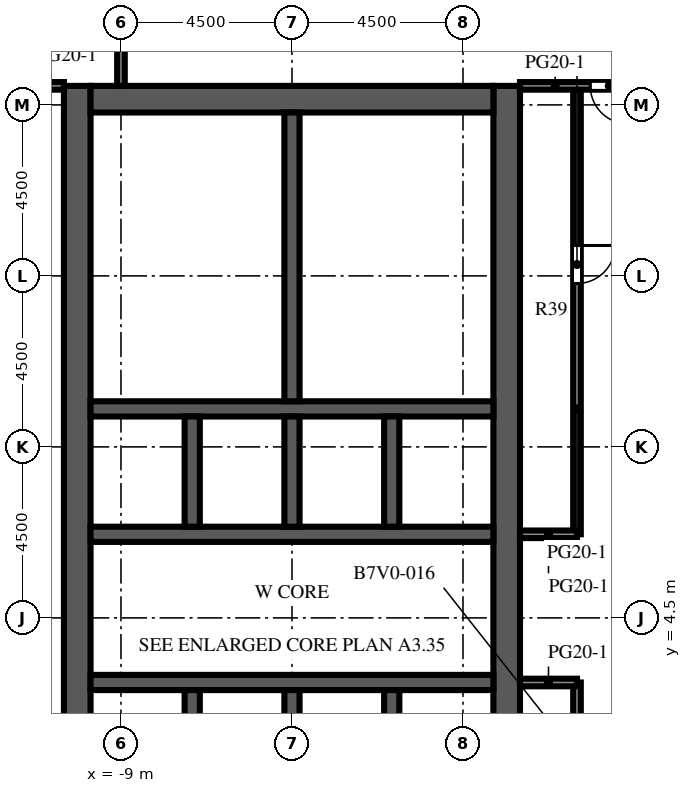
"""IFC4 building model, lengths in metres.
Left out: names, types, materials, properties, quantities, classifications, styles, units other than length and angle.
Written with IfcOpenShell. Run it as: python <this file> out.ifc"""

import sys

from ifc_helpers import new_model, si_unit, direction, frame, frame_2d, origin, place, context, subcontext, project, spatial, rectangle, extrude, element, fill, save


model = new_model("IFC4")
c1 = context("Model", 3, precision=1e-05, world=origin(), true_north=direction((0.0, 1.0)))
c2 = subcontext(c1, "Body", "Model", "MODEL_VIEW")
j1 = project(units=[si_unit("LENGTHUNIT", "METRE"), si_unit("PLANEANGLEUNIT", "RADIAN")], contexts=[c1])
p1 = place(None, origin())
s1 = spatial("IfcSite", under=j1, at=p1, CompositionType="ELEMENT")
p2 = place(p1, origin())
s2 = spatial("IfcBuilding", under=s1, at=p2, CompositionType="ELEMENT")
p3 = place(p2, frame((0.0, 0.0, 239.8)))
s3 = spatial("IfcBuildingStorey", under=s2, at=p3, CompositionType="ELEMENT", Elevation=239.8)
p4 = place(p3, frame((-10.15, -9.0, 0.0), z_axis=(0.0, 0.0, 1.0), x_axis=(0.0, 1.0, 0.0)))
e1 = element("IfcWall", 1, at=p4, inside=s3, PredefinedType="SHEAR", context=c2, shape_type="SweptSolid", body=[
    extrude(rectangle(XDim=27.5, YDim=0.7, at=frame_2d((13.75, 0.0))), origin(), (0.0, 0.0, 1.0), 4.1),
])
p5 = place(p4, frame((12.55, 0.0, 0.0)))
e2 = element("IfcOpeningElement", 2, at=p5, cuts=e1, PredefinedType="OPENING", context=c2, shape_type="SweptSolid", body=[
    extrude(rectangle(XDim=2.4, YDim=2.4, at=frame_2d((1.2, 1.2))), frame((0.0, 0.36, 0.0), z_axis=(0.0, -1.0, 0.0), x_axis=(1.0, 0.0, 0.0)), (0.0, 0.0, 1.0), 0.72),
])
p6 = place(p4, frame((6.825, 0.0, 0.0)))
e3 = element("IfcOpeningElement", 3, at=p6, cuts=e1, PredefinedType="OPENING", context=c2, shape_type="SweptSolid", body=[
    extrude(rectangle(XDim=1.2, YDim=2.1, at=frame_2d((0.6, 1.05))), frame((0.0, 0.36, 0.0), z_axis=(0.0, -1.0, 0.0), x_axis=(1.0, 0.0, 0.0)), (0.0, 0.0, 1.0), 0.72),
])
p7 = place(p4, frame((19.475, 0.0, 0.0)))
e4 = element("IfcOpeningElement", 4, at=p7, cuts=e1, PredefinedType="OPENING", context=c2, shape_type="SweptSolid", body=[
    extrude(rectangle(XDim=1.2, YDim=2.1, at=frame_2d((0.6, 1.05))), frame((0.0, 0.36, 0.0), z_axis=(0.0, -1.0, 0.0), x_axis=(1.0, 0.0, 0.0)), (0.0, 0.0, 1.0), 0.72),
])
p8 = place(p3, frame((1.15, -9.0, 0.0), z_axis=(0.0, 0.0, 1.0), x_axis=(0.0, 1.0, 0.0)))
e5 = element("IfcWall", 5, at=p8, inside=s3, PredefinedType="SHEAR", context=c2, shape_type="SweptSolid", body=[
    extrude(rectangle(XDim=27.5, YDim=0.7, at=frame_2d((13.75, 0.0))), origin(), (0.0, 0.0, 1.0), 4.1),
])
p9 = place(p8, frame((12.55, 0.0, 0.0)))
e6 = element("IfcOpeningElement", 6, at=p9, cuts=e5, PredefinedType="OPENING", context=c2, shape_type="SweptSolid", body=[
    extrude(rectangle(XDim=2.4, YDim=2.4, at=frame_2d((1.2, 1.2))), frame((0.0, 0.36, 0.0), z_axis=(0.0, -1.0, 0.0), x_axis=(1.0, 0.0, 0.0)), (0.0, 0.0, 1.0), 0.72),
])
p10 = place(p8, frame((5.42, 0.0, 0.0)))
e7 = element("IfcOpeningElement", 7, at=p10, cuts=e5, PredefinedType="OPENING", context=c2, shape_type="SweptSolid", body=[
    extrude(rectangle(XDim=1.2, YDim=2.1, at=frame_2d((0.6, 1.05))), frame((0.0, 0.36, 0.0), z_axis=(0.0, -1.0, 0.0), x_axis=(1.0, 0.0, 0.0)), (0.0, 0.0, 1.0), 0.72),
])
p11 = place(p8, frame((19.46, 0.0, 0.0)))
e8 = element("IfcOpeningElement", 8, at=p11, cuts=e5, PredefinedType="OPENING", context=c2, shape_type="SweptSolid", body=[
    extrude(rectangle(XDim=1.0, YDim=2.1, at=frame_2d((0.5, 1.05))), frame((0.0, 0.36, 0.0), z_axis=(0.0, -1.0, 0.0), x_axis=(1.0, 0.0, 0.0)), (0.0, 0.0, 1.0), 0.72),
])
p12 = place(p8, frame((21.17, 0.0, 0.0)))
e9 = element("IfcOpeningElement", 9, at=p12, cuts=e5, PredefinedType="OPENING", context=c2, shape_type="SweptSolid", body=[
    extrude(rectangle(XDim=1.0, YDim=2.1, at=frame_2d((0.5, 1.05))), frame((0.0, 0.36, 0.0), z_axis=(0.0, -1.0, 0.0), x_axis=(1.0, 0.0, 0.0)), (0.0, 0.0, 1.0), 0.72),
])
p13 = place(p8, frame((23.26, 0.0, 0.0)))
e10 = element("IfcOpeningElement", 10, at=p13, cuts=e5, PredefinedType="OPENING", context=c2, shape_type="SweptSolid", body=[
    extrude(rectangle(XDim=1.0, YDim=2.1, at=frame_2d((0.5, 1.05))), frame((0.0, 0.36, 0.0), z_axis=(0.0, -1.0, 0.0), x_axis=(1.0, 0.0, 0.0)), (0.0, 0.0, 1.0), 0.72),
])
p14 = place(p8, frame((25.35, 0.0, 0.0)))
e11 = element("IfcOpeningElement", 11, at=p14, cuts=e5, PredefinedType="OPENING", context=c2, shape_type="SweptSolid", body=[
    extrude(rectangle(XDim=1.0, YDim=2.1, at=frame_2d((0.5, 1.05))), frame((0.0, 0.36, 0.0), z_axis=(0.0, -1.0, 0.0), x_axis=(1.0, 0.0, 0.0)), (0.0, 0.0, 1.0), 0.72),
])
p15 = place(p3, frame((-9.8, 18.15, 0.0), z_axis=(0.0, 0.0, 1.0), x_axis=(1.0, 0.0, 0.0)))
e12 = element("IfcWall", 12, at=p15, inside=s3, PredefinedType="SHEAR", context=c2, shape_type="SweptSolid", body=[
    extrude(rectangle(XDim=10.6, YDim=0.7, at=frame_2d((5.3, 0.0))), origin(), (0.0, 0.0, 1.0), 4.1),
])
p16 = place(p3, frame((-9.8, 2.8, 0.0), z_axis=(0.0, 0.0, 1.0), x_axis=(1.0, 0.0, 0.0)))
e13 = element("IfcWall", 13, at=p16, inside=s3, PredefinedType="SHEAR", context=c2, shape_type="SweptSolid", body=[
    extrude(rectangle(XDim=10.6, YDim=0.4, at=frame_2d((5.3, 0.0))), origin(), (0.0, 0.0, 1.0), 4.1),
])
p17 = place(p16, frame((0.688, 0.0, 0.0)))
e14 = element("IfcOpeningElement", 14, at=p17, cuts=e13, PredefinedType="OPENING", context=c2, shape_type="SweptSolid", body=[
    extrude(rectangle(XDim=1.1, YDim=2.1, at=frame_2d((0.55, 1.05))), frame((0.0, 0.21, 0.0), z_axis=(0.0, -1.0, 0.0), x_axis=(1.0, 0.0, 0.0)), (0.0, 0.0, 1.0), 0.42),
])
p18 = place(p16, frame((3.438, 0.0, 0.0)))
e15 = element("IfcOpeningElement", 15, at=p18, cuts=e13, PredefinedType="OPENING", context=c2, shape_type="SweptSolid", body=[
    extrude(rectangle(XDim=1.1, YDim=2.1, at=frame_2d((0.55, 1.05))), frame((0.0, 0.21, 0.0), z_axis=(0.0, -1.0, 0.0), x_axis=(1.0, 0.0, 0.0)), (0.0, 0.0, 1.0), 0.42),
])
p19 = place(p16, frame((6.113, 0.0, 0.0)))
e16 = element("IfcOpeningElement", 16, at=p19, cuts=e13, PredefinedType="OPENING", context=c2, shape_type="SweptSolid", body=[
    extrude(rectangle(XDim=1.0, YDim=2.1, at=frame_2d((0.5, 1.05))), frame((0.0, 0.21, 0.0), z_axis=(0.0, -1.0, 0.0), x_axis=(1.0, 0.0, 0.0)), (0.0, 0.0, 1.0), 0.42),
])
p20 = place(p16, frame((8.863, 0.0, 0.0)))
e17 = element("IfcOpeningElement", 17, at=p20, cuts=e13, PredefinedType="OPENING", context=c2, shape_type="SweptSolid", body=[
    extrude(rectangle(XDim=1.0, YDim=2.1, at=frame_2d((0.5, 1.05))), frame((0.0, 0.21, 0.0), z_axis=(0.0, -1.0, 0.0), x_axis=(1.0, 0.0, 0.0)), (0.0, 0.0, 1.0), 0.42),
])
p21 = place(p3, frame((-9.8, 6.7, 0.0), z_axis=(0.0, 0.0, 1.0), x_axis=(1.0, 0.0, 0.0)))
e18 = element("IfcWall", 18, at=p21, inside=s3, PredefinedType="SHEAR", context=c2, shape_type="SweptSolid", body=[
    extrude(rectangle(XDim=10.6, YDim=0.4, at=frame_2d((5.3, 0.0))), origin(), (0.0, 0.0, 1.0), 4.1),
])
p22 = place(p21, frame((3.438, 0.0, 0.0)))
e19 = element("IfcOpeningElement", 19, at=p22, cuts=e18, PredefinedType="OPENING", context=c2, shape_type="SweptSolid", body=[
    extrude(rectangle(XDim=1.1, YDim=2.1, at=frame_2d((0.55, 1.05))), frame((0.0, 0.21, 0.0), z_axis=(0.0, -1.0, 0.0), x_axis=(1.0, 0.0, 0.0)), (0.0, 0.0, 1.0), 0.42),
])
p23 = place(p21, frame((6.062, 0.0, 0.0)))
e20 = element("IfcOpeningElement", 20, at=p23, cuts=e18, PredefinedType="OPENING", context=c2, shape_type="SweptSolid", body=[
    extrude(rectangle(XDim=1.1, YDim=2.1, at=frame_2d((0.55, 1.05))), frame((0.0, 0.21, 0.0), z_axis=(0.0, -1.0, 0.0), x_axis=(1.0, 0.0, 0.0)), (0.0, 0.0, 1.0), 0.42),
])
p24 = place(p21, frame((8.812, 0.0, 0.0)))
e21 = element("IfcOpeningElement", 21, at=p24, cuts=e18, PredefinedType="OPENING", context=c2, shape_type="SweptSolid", body=[
    extrude(rectangle(XDim=1.1, YDim=2.1, at=frame_2d((0.55, 1.05))), frame((0.0, 0.21, 0.0), z_axis=(0.0, -1.0, 0.0), x_axis=(1.0, 0.0, 0.0)), (0.0, 0.0, 1.0), 0.42),
])
p25 = place(p21, frame((0.738, 0.0, 0.0)))
e22 = element("IfcOpeningElement", 22, at=p25, cuts=e18, PredefinedType="OPENING", context=c2, shape_type="SweptSolid", body=[
    extrude(rectangle(XDim=1.0, YDim=2.1, at=frame_2d((0.5, 1.05))), frame((0.0, 0.21, 0.0), z_axis=(0.0, -1.0, 0.0), x_axis=(1.0, 0.0, 0.0)), (0.0, 0.0, 1.0), 0.42),
])
p26 = place(p3, frame((-9.8, 10.0, 0.0), z_axis=(0.0, 0.0, 1.0), x_axis=(1.0, 0.0, 0.0)))
e23 = element("IfcWall", 23, at=p26, inside=s3, PredefinedType="SHEAR", context=c2, shape_type="SweptSolid", body=[
    extrude(rectangle(XDim=10.6, YDim=0.4, at=frame_2d((5.3, 0.0))), origin(), (0.0, 0.0, 1.0), 4.1),
])
for number, where, z_axis, x_axis in (
    (24, (-7.125, -0.3, 0.0), (0.0, 0.0, 1.0), (0.0, 1.0, 0.0)),
    (25, (-7.125, 6.9, 0.0), (0.0, 0.0, 1.0), (0.0, 1.0, 0.0)),
    (26, (-4.5, -0.3, 0.0), (0.0, 0.0, 1.0), (0.0, 1.0, 0.0)),
    (27, (-4.5, 6.9, 0.0), (0.0, 0.0, 1.0), (0.0, 1.0, 0.0)),
    (28, (-1.875, -0.3, 0.0), (0.0, 0.0, 1.0), (0.0, 1.0, 0.0)),
    (29, (-1.875, 6.9, 0.0), (0.0, 0.0, 1.0), (0.0, 1.0, 0.0)),
):
    element("IfcWall", number, at=place(p3, frame(where, z_axis=z_axis, x_axis=x_axis)), inside=s3, PredefinedType="SHEAR", context=c2, shape_type="SweptSolid", body=[
        extrude(rectangle(XDim=2.9, YDim=0.4, at=frame_2d((1.45, 0.0))), origin(), (0.0, 0.0, 1.0), 4.1),
    ])
p27 = place(p3, frame((-4.5, 10.2, 0.0), z_axis=(0.0, 0.0, 1.0), x_axis=(0.0, 1.0, 0.0)))
e30 = element("IfcWall", 30, at=p27, inside=s3, PredefinedType="SHEAR", context=c2, shape_type="SweptSolid", body=[
    extrude(rectangle(XDim=7.6, YDim=0.4, at=frame_2d((3.8, 0.0))), origin(), (0.0, 0.0, 1.0), 4.1),
])
for number, where, z_axis, x_axis in (
    (31, (-4.3, 11.72, 0.0), (0.0, 0.0, 1.0), (1.0, 0.0, 0.0)),
    (32, (-4.3, 13.62, 0.0), (0.0, 0.0, 1.0), (1.0, 0.0, 0.0)),
    (33, (-4.3, 15.9, 0.0), (0.0, 0.0, 1.0), (1.0, 0.0, 0.0)),
):
    element("IfcWall", number, at=place(p3, frame(where, z_axis=z_axis, x_axis=x_axis)), inside=s3, PredefinedType="PARTITIONING", context=c2, shape_type="SweptSolid", body=[
        extrude(rectangle(XDim=5.1, YDim=0.1, at=frame_2d((2.55, 0.0))), origin(), (0.0, 0.0, 1.0), 3.65),
    ])
p28 = place(p3, frame((-9.0, 18.5, 0.0), z_axis=(0.0, 0.0, 1.0), x_axis=(0.0, 1.0, 0.0)))
e34 = element("IfcWall", 34, at=p28, inside=s3, PredefinedType="PARTITIONING", context=c2, shape_type="SweptSolid", body=[
    extrude(rectangle(XDim=3.5, YDim=0.2, at=frame_2d((1.75, 0.0))), origin(), (0.0, 0.0, 1.0), 3.65),
])
p29 = place(p3, frame((3.0, -2.0, 0.0), z_axis=(0.0, 0.0, 1.0), x_axis=(0.0, 1.0, 0.0)))
e35 = element("IfcWall", 35, at=p29, inside=s3, PredefinedType="PARTITIONING", context=c2, shape_type="SweptSolid", body=[
    extrude(rectangle(XDim=4.8, YDim=0.2, at=frame_2d((2.4, 0.0))), origin(), (0.0, 0.0, 1.0), 3.65),
])
p30 = place(p29, frame((2.35, 0.0, 0.0)))
e36 = element("IfcOpeningElement", 36, at=p30, cuts=e35, PredefinedType="OPENING", context=c2, shape_type="SweptSolid", body=[
    extrude(rectangle(XDim=1.0, YDim=2.1, at=frame_2d((0.5, 1.05))), frame((0.0, 0.11, 0.0), z_axis=(0.0, -1.0, 0.0), x_axis=(1.0, 0.0, 0.0)), (0.0, 0.0, 1.0), 0.22),
])
p31 = place(p3, frame((3.0, 6.7, 0.0), z_axis=(0.0, 0.0, 1.0), x_axis=(0.0, 1.0, 0.0)))
e37 = element("IfcWall", 37, at=p31, inside=s3, PredefinedType="PARTITIONING", context=c2, shape_type="SweptSolid", body=[
    extrude(rectangle(XDim=11.8, YDim=0.2, at=frame_2d((5.9, 0.0))), origin(), (0.0, 0.0, 1.0), 3.65),
])
p32 = place(p31, frame((6.6, 0.0, 0.0)))
e38 = element("IfcOpeningElement", 38, at=p32, cuts=e37, PredefinedType="OPENING", context=c2, shape_type="SweptSolid", body=[
    extrude(rectangle(XDim=1.0, YDim=2.1, at=frame_2d((0.5, 1.05))), frame((0.0, 0.11, 0.0), z_axis=(0.0, -1.0, 0.0), x_axis=(1.0, 0.0, 0.0)), (0.0, 0.0, 1.0), 0.22),
])
for number, where, z_axis, x_axis in (
    (39, (1.5, 2.8, 0.0), (0.0, 0.0, 1.0), (1.0, 0.0, 0.0)),
    (40, (1.5, 6.7, 0.0), (0.0, 0.0, 1.0), (1.0, 0.0, 0.0)),
):
    element("IfcWall", number, at=place(p3, frame(where, z_axis=z_axis, x_axis=x_axis)), inside=s3, PredefinedType="PARTITIONING", context=c2, shape_type="SweptSolid", body=[
        extrude(rectangle(XDim=1.5, YDim=0.2, at=frame_2d((0.75, 0.0))), origin(), (0.0, 0.0, 1.0), 3.65),
    ])
p33 = place(p3, frame((-13.5, 18.5, 0.0), z_axis=(0.0, 0.0, 1.0), x_axis=(1.0, 0.0, 0.0)))
e41 = element("IfcWall", 41, at=p33, inside=s3, PredefinedType="PARTITIONING", context=c2, shape_type="SweptSolid", body=[
    extrude(rectangle(XDim=3.0, YDim=0.2, at=frame_2d((1.5, 0.0))), origin(), (0.0, 0.0, 1.0), 3.65),
])
p34 = place(p33, frame((0.6, 0.0, 0.0)))
e42 = element("IfcOpeningElement", 42, at=p34, cuts=e41, PredefinedType="OPENING", context=c2, shape_type="SweptSolid", body=[
    extrude(rectangle(XDim=1.0, YDim=2.1, at=frame_2d((0.5, 1.05))), frame((0.0, 0.11, 0.0), z_axis=(0.0, -1.0, 0.0), x_axis=(1.0, 0.0, 0.0)), (0.0, 0.0, 1.0), 0.22),
])
p35 = place(p3, frame((1.5, 18.5, 0.0), z_axis=(0.0, 0.0, 1.0), x_axis=(1.0, 0.0, 0.0)))
e43 = element("IfcWall", 43, at=p35, inside=s3, PredefinedType="PARTITIONING", context=c2, shape_type="SweptSolid", body=[
    extrude(rectangle(XDim=4.5, YDim=0.2, at=frame_2d((2.25, 0.0))), origin(), (0.0, 0.0, 1.0), 3.65),
])
p36 = place(p35, frame((1.85, 0.0, 0.0)))
e44 = element("IfcOpeningElement", 44, at=p36, cuts=e43, PredefinedType="OPENING", context=c2, shape_type="SweptSolid", body=[
    extrude(rectangle(XDim=1.0, YDim=2.1, at=frame_2d((0.5, 1.05))), frame((0.0, 0.11, 0.0), z_axis=(0.0, -1.0, 0.0), x_axis=(1.0, 0.0, 0.0)), (0.0, 0.0, 1.0), 0.22),
])
p37 = place(p17, origin())
e45 = element("IfcDoor", 45, at=p37, inside=s3, OperationType="DOUBLE_DOOR_SLIDING", PredefinedType="DOOR", context=c2, shape_type="SweptSolid", body=[
    extrude(rectangle(XDim=1.1, YDim=2.1, at=frame_2d((0.55, 1.05))), frame((0.0, 0.025, 0.0), z_axis=(0.0, -1.0, 0.0), x_axis=(1.0, 0.0, 0.0)), (0.0, 0.0, 1.0), 0.05),
])
fill(e14, e45)
p38 = place(p18, origin())
e46 = element("IfcDoor", 46, at=p38, inside=s3, OperationType="DOUBLE_DOOR_SLIDING", PredefinedType="DOOR", context=c2, shape_type="SweptSolid", body=[
    extrude(rectangle(XDim=1.1, YDim=2.1, at=frame_2d((0.55, 1.05))), frame((0.0, 0.025, 0.0), z_axis=(0.0, -1.0, 0.0), x_axis=(1.0, 0.0, 0.0)), (0.0, 0.0, 1.0), 0.05),
])
fill(e15, e46)
p39 = place(p22, origin())
e47 = element("IfcDoor", 47, at=p39, inside=s3, OperationType="DOUBLE_DOOR_SLIDING", PredefinedType="DOOR", context=c2, shape_type="SweptSolid", body=[
    extrude(rectangle(XDim=1.1, YDim=2.1, at=frame_2d((0.55, 1.05))), frame((0.0, 0.025, 0.0), z_axis=(0.0, -1.0, 0.0), x_axis=(1.0, 0.0, 0.0)), (0.0, 0.0, 1.0), 0.05),
])
fill(e19, e47)
p40 = place(p23, origin())
e48 = element("IfcDoor", 48, at=p40, inside=s3, OperationType="DOUBLE_DOOR_SLIDING", PredefinedType="DOOR", context=c2, shape_type="SweptSolid", body=[
    extrude(rectangle(XDim=1.1, YDim=2.1, at=frame_2d((0.55, 1.05))), frame((0.0, 0.025, 0.0), z_axis=(0.0, -1.0, 0.0), x_axis=(1.0, 0.0, 0.0)), (0.0, 0.0, 1.0), 0.05),
])
fill(e20, e48)
p41 = place(p24, origin())
e49 = element("IfcDoor", 49, at=p41, inside=s3, OperationType="DOUBLE_DOOR_SLIDING", PredefinedType="DOOR", context=c2, shape_type="SweptSolid", body=[
    extrude(rectangle(XDim=1.1, YDim=2.1, at=frame_2d((0.55, 1.05))), frame((0.0, 0.025, 0.0), z_axis=(0.0, -1.0, 0.0), x_axis=(1.0, 0.0, 0.0)), (0.0, 0.0, 1.0), 0.05),
])
fill(e21, e49)
p42 = place(p5, origin())
e50 = element("IfcDoor", 50, at=p42, inside=s3, OperationType="DOUBLE_DOOR_DOUBLE_SWING", PredefinedType="DOOR", context=c2, shape_type="SweptSolid", body=[
    extrude(rectangle(XDim=2.4, YDim=2.4, at=frame_2d((1.2, 1.2))), frame((0.0, 0.025, 0.0), z_axis=(0.0, -1.0, 0.0), x_axis=(1.0, 0.0, 0.0)), (0.0, 0.0, 1.0), 0.05),
])
fill(e2, e50)
p43 = place(p9, origin())
e51 = element("IfcDoor", 51, at=p43, inside=s3, OperationType="DOUBLE_DOOR_DOUBLE_SWING", PredefinedType="DOOR", context=c2, shape_type="SweptSolid", body=[
    extrude(rectangle(XDim=2.4, YDim=2.4, at=frame_2d((1.2, 1.2))), frame((0.0, 0.025, 0.0), z_axis=(0.0, -1.0, 0.0), x_axis=(1.0, 0.0, 0.0)), (0.0, 0.0, 1.0), 0.05),
])
fill(e6, e51)
p44 = place(p7, origin())
e52 = element("IfcDoor", 52, at=p44, inside=s3, OperationType="SINGLE_SWING_LEFT", PredefinedType="DOOR", context=c2, shape_type="SweptSolid", body=[
    extrude(rectangle(XDim=1.2, YDim=2.1, at=frame_2d((0.6, 1.05))), frame((0.0, 0.025, 0.0), z_axis=(0.0, -1.0, 0.0), x_axis=(1.0, 0.0, 0.0)), (0.0, 0.0, 1.0), 0.05),
])
fill(e4, e52)
p45 = place(p19, origin())
e53 = element("IfcDoor", 53, at=p45, inside=s3, OperationType="SINGLE_SWING_LEFT", PredefinedType="DOOR", context=c2, shape_type="SweptSolid", body=[
    extrude(rectangle(XDim=1.0, YDim=2.1, at=frame_2d((0.5, 1.05))), frame((0.0, 0.025, 0.0), z_axis=(0.0, -1.0, 0.0), x_axis=(1.0, 0.0, 0.0)), (0.0, 0.0, 1.0), 0.05),
])
fill(e16, e53)
p46 = place(p20, origin())
e54 = element("IfcDoor", 54, at=p46, inside=s3, OperationType="SINGLE_SWING_RIGHT", PredefinedType="DOOR", context=c2, shape_type="SweptSolid", body=[
    extrude(rectangle(XDim=1.0, YDim=2.1, at=frame_2d((0.5, 1.05))), frame((0.0, 0.025, 0.0), z_axis=(0.0, -1.0, 0.0), x_axis=(1.0, 0.0, 0.0)), (0.0, 0.0, 1.0), 0.05),
])
fill(e17, e54)
p47 = place(p25, origin())
e55 = element("IfcDoor", 55, at=p47, inside=s3, OperationType="SINGLE_SWING_LEFT", PredefinedType="DOOR", context=c2, shape_type="SweptSolid", body=[
    extrude(rectangle(XDim=1.0, YDim=2.1, at=frame_2d((0.5, 1.05))), frame((0.0, 0.025, 0.0), z_axis=(0.0, -1.0, 0.0), x_axis=(1.0, 0.0, 0.0)), (0.0, 0.0, 1.0), 0.05),
])
fill(e22, e55)
p48 = place(p11, origin())
e56 = element("IfcDoor", 56, at=p48, inside=s3, OperationType="SINGLE_SWING_LEFT", PredefinedType="DOOR", context=c2, shape_type="SweptSolid", body=[
    extrude(rectangle(XDim=1.0, YDim=2.1, at=frame_2d((0.5, 1.05))), frame((0.0, 0.325, 0.0), z_axis=(0.0, -1.0, 0.0), x_axis=(1.0, 0.0, 0.0)), (0.0, 0.0, 1.0), 0.05),
])
fill(e8, e56)
p49 = place(p12, origin())
e57 = element("IfcDoor", 57, at=p49, inside=s3, OperationType="SINGLE_SWING_RIGHT", PredefinedType="DOOR", context=c2, shape_type="SweptSolid", body=[
    extrude(rectangle(XDim=1.0, YDim=2.1, at=frame_2d((0.5, 1.05))), frame((0.0, 0.325, 0.0), z_axis=(0.0, -1.0, 0.0), x_axis=(1.0, 0.0, 0.0)), (0.0, 0.0, 1.0), 0.05),
])
fill(e9, e57)
p50 = place(p13, origin())
e58 = element("IfcDoor", 58, at=p50, inside=s3, OperationType="SINGLE_SWING_LEFT", PredefinedType="DOOR", context=c2, shape_type="SweptSolid", body=[
    extrude(rectangle(XDim=1.0, YDim=2.1, at=frame_2d((0.5, 1.05))), frame((0.0, 0.325, 0.0), z_axis=(0.0, -1.0, 0.0), x_axis=(1.0, 0.0, 0.0)), (0.0, 0.0, 1.0), 0.05),
])
fill(e10, e58)
p51 = place(p14, origin())
e59 = element("IfcDoor", 59, at=p51, inside=s3, OperationType="SINGLE_SWING_RIGHT", PredefinedType="DOOR", context=c2, shape_type="SweptSolid", body=[
    extrude(rectangle(XDim=1.0, YDim=2.1, at=frame_2d((0.5, 1.05))), frame((0.0, 0.325, 0.0), z_axis=(0.0, -1.0, 0.0), x_axis=(1.0, 0.0, 0.0)), (0.0, 0.0, 1.0), 0.05),
])
fill(e11, e59)
p52 = place(p32, origin())
e60 = element("IfcDoor", 60, at=p52, inside=s3, OperationType="SINGLE_SWING_RIGHT", PredefinedType="DOOR", context=c2, shape_type="SweptSolid", body=[
    extrude(rectangle(XDim=1.0, YDim=2.1, at=frame_2d((0.5, 1.05))), frame((0.0, 0.025, 0.0), z_axis=(0.0, -1.0, 0.0), x_axis=(1.0, 0.0, 0.0)), (0.0, 0.0, 1.0), 0.05),
])
fill(e38, e60)
p53 = place(p36, origin())
e61 = element("IfcDoor", 61, at=p53, inside=s3, OperationType="SINGLE_SWING_RIGHT", PredefinedType="DOOR", context=c2, shape_type="SweptSolid", body=[
    extrude(rectangle(XDim=1.0, YDim=2.1, at=frame_2d((0.5, 1.05))), frame((0.0, 0.025, 0.0), z_axis=(0.0, -1.0, 0.0), x_axis=(1.0, 0.0, 0.0)), (0.0, 0.0, 1.0), 0.05),
])
fill(e44, e61)
save(model, sys.argv[1])
